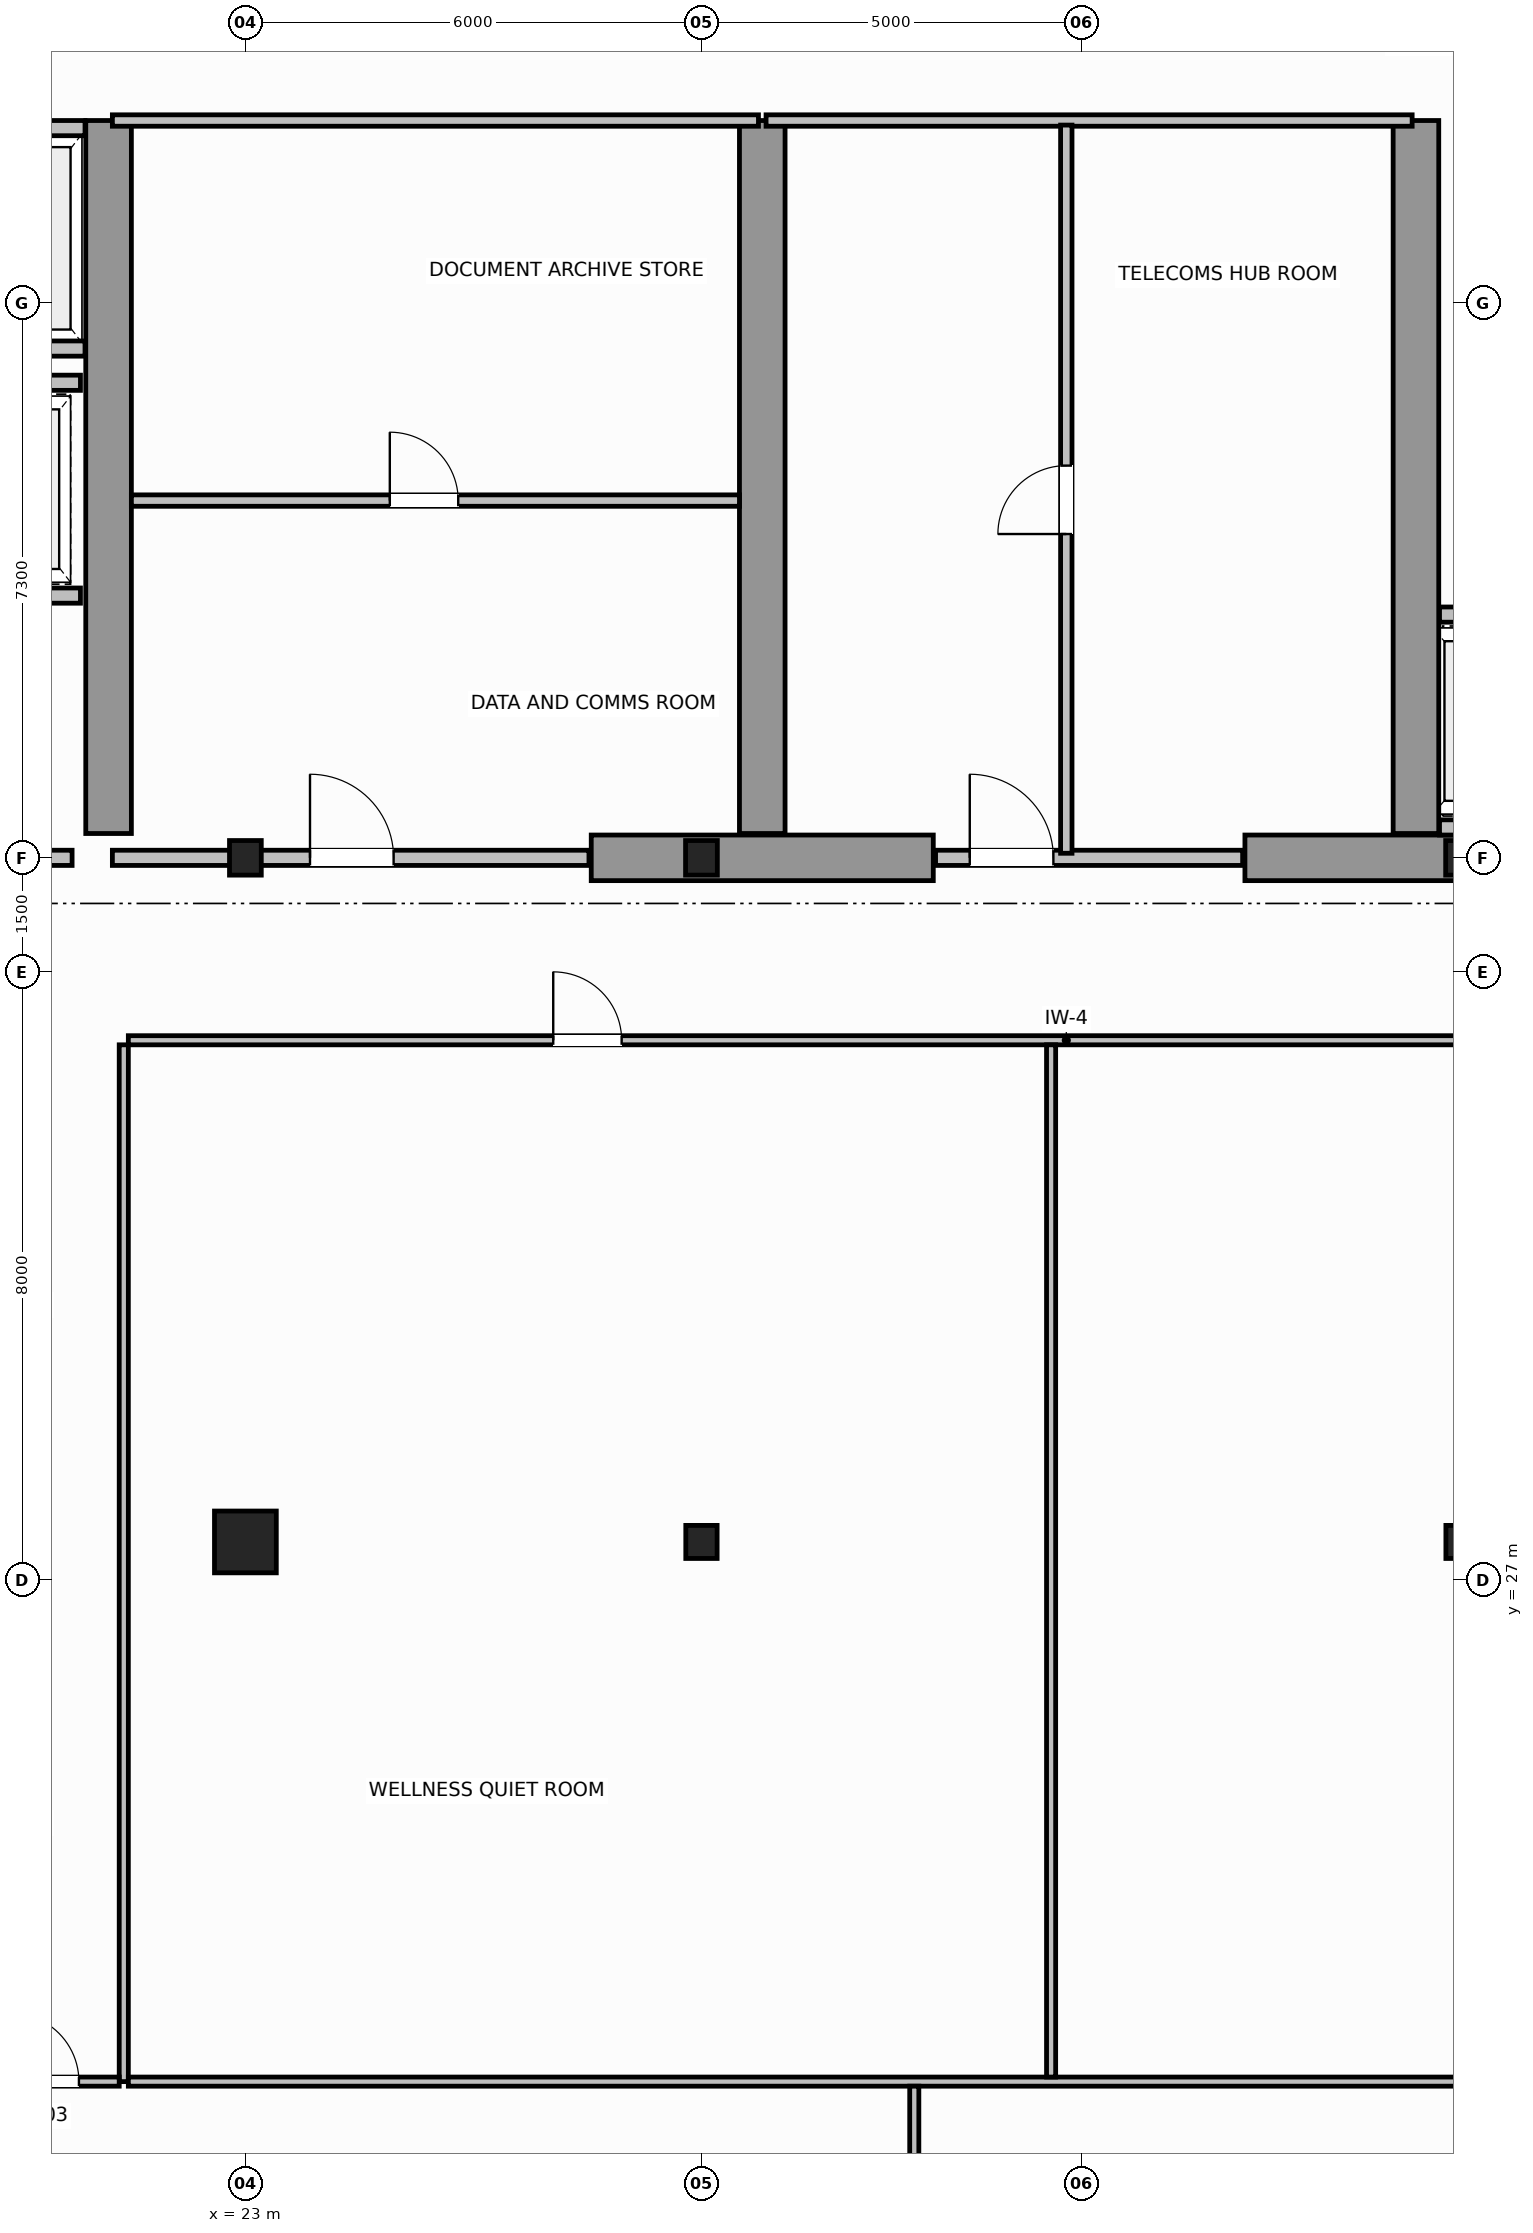
"""IFC4 building model, lengths in metres.
Left out: names, types, materials, properties, quantities, classifications, styles, units other than length and angle.
Written with IfcOpenShell. Run it as: python <this file> out.ifc"""

import sys

from ifc_helpers import new_model, si_unit, direction, frame, frame_2d, origin, origin_2d, place, context, subcontext, project, spatial, rectangle, hollow_circle, i_section, extrude, source, transform, mapped, element, fill, save


model = new_model("IFC4")
c1 = context("Model", 3, precision=1e-05, world=origin(), true_north=direction((0.0, 1.0)))
c2 = subcontext(c1, "Body", "Model", "MODEL_VIEW")
j1 = project(units=[si_unit("LENGTHUNIT", "METRE"), si_unit("PLANEANGLEUNIT", "RADIAN")], contexts=[c1])
p1 = place(None, origin())
s1 = spatial("IfcSite", under=j1, at=p1, CompositionType="ELEMENT")
p2 = place(p1, origin())
s2 = spatial("IfcBuilding", under=s1, at=p2, CompositionType="ELEMENT")
p3 = place(p2, frame((0.0, 0.0, 210.8)))
s3 = spatial("IfcBuildingStorey", under=s2, at=p3, CompositionType="ELEMENT", Elevation=210.8)
m1 = source(origin(), c2, "Body", "SweptSolid", [
    extrude(i_section(OverallWidth=0.418, OverallDepth=0.455, WebThickness=0.042, FlangeThickness=0.058, FilletRadius=0.015, at=origin_2d()), origin(), (0.0, 0.0, 1.0), 3.8),
])
for number, where, z_axis, x_axis in (
    (1, (23.0, 36.5, 0.0), (0.0, 0.0, 1.0), (1.0, 0.0, 0.0)),
    (2, (29.0, 36.5, 0.0), (0.0, 0.0, 1.0), (1.0, 0.0, 0.0)),
    (3, (39.0, 36.5, 0.0), (0.0, 0.0, 1.0), (1.0, 0.0, 0.0)),
):
    element("IfcColumn", number, at=place(p3, frame(where, z_axis=z_axis, x_axis=x_axis)), inside=s3, PredefinedType="COLUMN", context=c2, shape_type="MappedRepresentation", body=[
        mapped(m1, transform((0.0, 0.0, 0.0), scale=1.0)),
    ])
m2 = source(origin(), c2, "Body", "SweptSolid", [
    extrude(hollow_circle(Radius=0.406, WallThickness=0.04, at=origin_2d()), origin(), (0.0, 0.0, 1.0), 3.8),
])
p4 = place(p3, frame((23.0, 27.5, 0.0), z_axis=(0.0, 0.0, 1.0), x_axis=(1.0, 0.0, 0.0)))
e4 = element("IfcColumn", 4, at=p4, inside=s3, PredefinedType="COLUMN", context=c2, shape_type="MappedRepresentation", body=[
    mapped(m2, transform((0.0, 0.0, 0.0), scale=1.0)),
])
m3 = source(origin(), c2, "Body", "SweptSolid", [
    extrude(i_section(OverallWidth=0.412, OverallDepth=0.435, WebThickness=0.036, FlangeThickness=0.05, FilletRadius=0.015, at=origin_2d()), origin(), (0.0, 0.0, 1.0), 3.8),
])
for number, where, z_axis, x_axis in (
    (5, (29.0, 27.5, 0.0), (0.0, 0.0, 1.0), (1.0, 0.0, 0.0)),
    (6, (39.0, 27.5, 0.0), (0.0, 0.0, 1.0), (1.0, 0.0, 0.0)),
):
    element("IfcColumn", number, at=place(p3, frame(where, z_axis=z_axis, x_axis=x_axis)), inside=s3, PredefinedType="COLUMN", context=c2, shape_type="MappedRepresentation", body=[
        mapped(m3, transform((0.0, 0.0, 0.0), scale=1.0)),
    ])
for number, where, z_axis, x_axis in (
    (7, (27.55, 36.5, 0.0), (0.0, 0.0, 1.0), (1.0, 0.0, 0.0)),
    (8, (36.15, 36.5, 0.0), (0.0, 0.0, 1.0), (1.0, 0.0, 0.0)),
):
    element("IfcWall", number, at=place(p3, frame(where, z_axis=z_axis, x_axis=x_axis)), inside=s3, PredefinedType="SHEAR", context=c2, shape_type="SweptSolid", body=[
        extrude(rectangle(XDim=4.5, YDim=0.6, at=frame_2d((2.25, 0.0))), origin(), (0.0, 0.0, 1.0), 3.8),
    ])
for number, where, z_axis, x_axis in (
    (9, (21.2, 36.82, 0.0), (0.0, 0.0, 1.0), (0.0, 1.0, 0.0)),
    (10, (29.8, 36.82, 0.0), (0.0, 0.0, 1.0), (0.0, 1.0, 0.0)),
    (11, (38.4, 36.82, 0.0), (0.0, 0.0, 1.0), (0.0, 1.0, 0.0)),
):
    element("IfcWall", number, at=place(p3, frame(where, z_axis=z_axis, x_axis=x_axis)), inside=s3, PredefinedType="SHEAR", context=c2, shape_type="SweptSolid", body=[
        extrude(rectangle(XDim=9.38, YDim=0.6, at=frame_2d((4.69, 0.0))), origin(), (0.0, 0.0, 1.0), 3.8),
    ])
p5 = place(p3, frame((18.25, 36.5, 0.0), z_axis=(0.0, 0.0, 1.0), x_axis=(1.0, 0.0, 0.0)))
e12 = element("IfcWall", 12, at=p5, inside=s3, PredefinedType="SOLIDWALL", context=c2, shape_type="SweptSolid", body=[
    extrude(rectangle(XDim=2.47, YDim=0.2, at=frame_2d((1.235, 0.0))), origin(), (0.0, 0.0, 1.0), 2.57),
])
p6 = place(p5, frame((0.65, 0.0, 0.0)))
e13 = element("IfcOpeningElement", 13, at=p6, cuts=e12, PredefinedType="OPENING", context=c2, shape_type="SweptSolid", body=[
    extrude(rectangle(XDim=1.1, YDim=2.15, at=frame_2d((0.55, 1.075))), frame((0.0, 0.11, 0.0), z_axis=(0.0, -1.0, 0.0), x_axis=(1.0, 0.0, 0.0)), (0.0, 0.0, 1.0), 0.22),
])
p7 = place(p3, frame((38.71, 39.7, 0.0), z_axis=(0.0, 0.0, 1.0), x_axis=(1.0, 0.0, 0.0)))
e14 = element("IfcWall", 14, at=p7, inside=s3, PredefinedType="SOLIDWALL", context=c2, shape_type="SweptSolid", body=[
    extrude(rectangle(XDim=1.92, YDim=0.2, at=frame_2d((0.96, 0.0))), origin(), (0.0, 0.0, 1.0), 3.58),
])
p8 = place(p7, frame((0.41, 0.0, 0.0)))
e15 = element("IfcOpeningElement", 15, at=p8, cuts=e14, PredefinedType="OPENING", context=c2, shape_type="SweptSolid", body=[
    extrude(rectangle(XDim=1.1, YDim=2.15, at=frame_2d((0.55, 1.075))), frame((0.0, 0.11, 0.0), z_axis=(0.0, -1.0, 0.0), x_axis=(1.0, 0.0, 0.0)), (0.0, 0.0, 1.0), 0.22),
])
p9 = place(p3, frame((38.71, 36.9, 0.0), z_axis=(0.0, 0.0, 1.0), x_axis=(1.0, 0.0, 0.0)))
e16 = element("IfcWall", 16, at=p9, inside=s3, PredefinedType="SOLIDWALL", context=c2, shape_type="SweptSolid", body=[
    extrude(rectangle(XDim=1.92, YDim=0.2, at=frame_2d((0.96, 0.0))), origin(), (0.0, 0.0, 1.0), 3.58),
])
p10 = place(p3, frame((18.67, 46.1, 0.0), z_axis=(0.0, 0.0, 1.0), x_axis=(1.0, 0.0, 0.0)))
e17 = element("IfcWall", 17, at=p10, inside=s3, PredefinedType="SOLIDWALL", context=c2, shape_type="SweptSolid", body=[
    extrude(rectangle(XDim=2.22, YDim=0.2, at=frame_2d((1.11, 0.0))), origin(), (0.0, 0.0, 1.0), 3.58),
])
p11 = place(p10, frame((0.56, 0.0, 0.0)))
e18 = element("IfcOpeningElement", 18, at=p11, cuts=e17, PredefinedType="OPENING", context=c2, shape_type="SweptSolid", body=[
    extrude(rectangle(XDim=1.1, YDim=2.15, at=frame_2d((0.55, 1.075))), frame((0.0, 0.11, 0.0), z_axis=(0.0, -1.0, 0.0), x_axis=(1.0, 0.0, 0.0)), (0.0, 0.0, 1.0), 0.22),
])
p12 = place(p3, frame((18.67, 43.2, 0.0), z_axis=(0.0, 0.0, 1.0), x_axis=(1.0, 0.0, 0.0)))
e19 = element("IfcWall", 19, at=p12, inside=s3, PredefinedType="SOLIDWALL", context=c2, shape_type="SweptSolid", body=[
    extrude(rectangle(XDim=2.22, YDim=0.2, at=frame_2d((1.11, 0.0))), origin(), (0.0, 0.0, 1.0), 3.58),
])
p13 = place(p3, frame((18.67, 39.95, 0.0), z_axis=(0.0, 0.0, 1.0), x_axis=(1.0, 0.0, 0.0)))
e20 = element("IfcWall", 20, at=p13, inside=s3, PredefinedType="SOLIDWALL", context=c2, shape_type="SweptSolid", body=[
    extrude(rectangle(XDim=2.16, YDim=0.2, at=frame_2d((1.08, 0.0))), origin(), (0.0, 0.0, 1.0), 3.58),
])
p14 = place(p13, frame((0.53, 0.0, 0.0)))
e21 = element("IfcOpeningElement", 21, at=p14, cuts=e20, PredefinedType="OPENING", context=c2, shape_type="SweptSolid", body=[
    extrude(rectangle(XDim=1.1, YDim=2.15, at=frame_2d((0.55, 1.075))), frame((0.0, 0.11, 0.0), z_axis=(0.0, -1.0, 0.0), x_axis=(1.0, 0.0, 0.0)), (0.0, 0.0, 1.0), 0.22),
])
p15 = place(p3, frame((18.67, 42.75, 0.0), z_axis=(0.0, 0.0, 1.0), x_axis=(1.0, 0.0, 0.0)))
e22 = element("IfcWall", 22, at=p15, inside=s3, PredefinedType="SOLIDWALL", context=c2, shape_type="SweptSolid", body=[
    extrude(rectangle(XDim=2.16, YDim=0.2, at=frame_2d((1.08, 0.0))), origin(), (0.0, 0.0, 1.0), 3.58),
])
p16 = place(p3, frame((21.25, 36.5, 0.0), z_axis=(0.0, 0.0, 1.0), x_axis=(1.0, 0.0, 0.0)))
e23 = element("IfcWall", 23, at=p16, inside=s3, PredefinedType="SOLIDWALL", context=c2, shape_type="SweptSolid", body=[
    extrude(rectangle(XDim=6.27, YDim=0.2, at=frame_2d((3.135, 0.0))), origin(), (0.0, 0.0, 1.0), 2.57),
])
p17 = place(p16, frame((2.6, 0.0, 0.0)))
e24 = element("IfcOpeningElement", 24, at=p17, cuts=e23, PredefinedType="OPENING", context=c2, shape_type="SweptSolid", body=[
    extrude(rectangle(XDim=1.1, YDim=2.15, at=frame_2d((0.55, 1.075))), frame((0.0, 0.11, 0.0), z_axis=(0.0, -1.0, 0.0), x_axis=(1.0, 0.0, 0.0)), (0.0, 0.0, 1.0), 0.22),
])
p18 = place(p3, frame((21.25, 46.2, 0.0), z_axis=(0.0, 0.0, 1.0), x_axis=(1.0, 0.0, 0.0)))
e25 = element("IfcWall", 25, at=p18, inside=s3, PredefinedType="PARTITIONING", context=c2, shape_type="SweptSolid", body=[
    extrude(rectangle(XDim=8.5, YDim=0.15, at=frame_2d((4.25, 0.0))), origin(), (0.0, 0.0, 1.0), 3.58),
])
p19 = place(p3, frame((21.5, 41.2, 0.0), z_axis=(0.0, 0.0, 1.0), x_axis=(1.0, 0.0, 0.0)))
e26 = element("IfcWall", 26, at=p19, inside=s3, PredefinedType="PARTITIONING", context=c2, shape_type="SweptSolid", body=[
    extrude(rectangle(XDim=8.0, YDim=0.15, at=frame_2d((4.0, 0.0))), origin(), (0.0, 0.0, 1.0), 3.58),
])
p20 = place(p19, frame((3.4, 0.0, 0.0)))
e27 = element("IfcOpeningElement", 27, at=p20, cuts=e26, PredefinedType="OPENING", context=c2, shape_type="SweptSolid", body=[
    extrude(rectangle(XDim=0.9, YDim=2.1, at=frame_2d((0.45, 1.05))), frame((0.0, 0.085, 0.0), z_axis=(0.0, -1.0, 0.0), x_axis=(1.0, 0.0, 0.0)), (0.0, 0.0, 1.0), 0.17),
])
p21 = place(p3, frame((32.08, 36.5, 0.0), z_axis=(0.0, 0.0, 1.0), x_axis=(1.0, 0.0, 0.0)))
e28 = element("IfcWall", 28, at=p21, inside=s3, PredefinedType="SOLIDWALL", context=c2, shape_type="SweptSolid", body=[
    extrude(rectangle(XDim=4.04, YDim=0.2, at=frame_2d((2.02, 0.0))), origin(), (0.0, 0.0, 1.0), 2.97),
])
p22 = place(p21, frame((0.45, 0.0, 0.0)))
e29 = element("IfcOpeningElement", 29, at=p22, cuts=e28, PredefinedType="OPENING", context=c2, shape_type="SweptSolid", body=[
    extrude(rectangle(XDim=1.1, YDim=2.15, at=frame_2d((0.55, 1.075))), frame((0.0, 0.11, 0.0), z_axis=(0.0, -1.0, 0.0), x_axis=(1.0, 0.0, 0.0)), (0.0, 0.0, 1.0), 0.22),
])
p23 = place(p3, frame((29.85, 46.2, 0.0), z_axis=(0.0, 0.0, 1.0), x_axis=(1.0, 0.0, 0.0)))
e30 = element("IfcWall", 30, at=p23, inside=s3, PredefinedType="PARTITIONING", context=c2, shape_type="SweptSolid", body=[
    extrude(rectangle(XDim=8.5, YDim=0.15, at=frame_2d((4.25, 0.0))), origin(), (0.0, 0.0, 1.0), 3.58),
])
p24 = place(p3, frame((33.8, 36.56, 0.0), z_axis=(0.0, 0.0, 1.0), x_axis=(0.0, 1.0, 0.0)))
e31 = element("IfcWall", 31, at=p24, inside=s3, PredefinedType="PARTITIONING", context=c2, shape_type="SweptSolid", body=[
    extrude(rectangle(XDim=9.58, YDim=0.15, at=frame_2d((4.79, 0.0))), origin(), (0.0, 0.0, 1.0), 3.58),
])
p25 = place(p24, frame((4.2, 0.0, 0.0)))
e32 = element("IfcOpeningElement", 32, at=p25, cuts=e31, PredefinedType="OPENING", context=c2, shape_type="SweptSolid", body=[
    extrude(rectangle(XDim=0.9, YDim=2.1, at=frame_2d((0.45, 1.05))), frame((0.0, 0.085, 0.0), z_axis=(0.0, -1.0, 0.0), x_axis=(1.0, 0.0, 0.0)), (0.0, 0.0, 1.0), 0.17),
])
p26 = place(p3, frame((21.46, 34.1, 0.0), z_axis=(0.0, 0.0, 1.0), x_axis=(1.0, 0.0, 0.0)))
e33 = element("IfcWall", 33, at=p26, inside=s3, PredefinedType="PARTITIONING", context=c2, shape_type="SweptSolid", body=[
    extrude(rectangle(XDim=25.08, YDim=0.12, at=frame_2d((12.54, 0.0))), origin(), (0.0, 0.0, 1.0), 3.58),
])
p27 = place(p26, frame((5.59, 0.0, 0.0)))
e34 = element("IfcOpeningElement", 34, at=p27, cuts=e33, PredefinedType="OPENING", context=c2, shape_type="SweptSolid", body=[
    extrude(rectangle(XDim=0.9, YDim=2.15, at=frame_2d((0.45, 1.075))), frame((0.0, 0.07, 0.0), z_axis=(0.0, -1.0, 0.0), x_axis=(1.0, 0.0, 0.0)), (0.0, 0.0, 1.0), 0.14),
])
p28 = place(p26, frame((18.19, 0.0, 0.0)))
e35 = element("IfcOpeningElement", 35, at=p28, cuts=e33, PredefinedType="OPENING", context=c2, shape_type="SweptSolid", body=[
    extrude(rectangle(XDim=0.9, YDim=2.15, at=frame_2d((0.45, 1.075))), frame((0.0, 0.07, 0.0), z_axis=(0.0, -1.0, 0.0), x_axis=(1.0, 0.0, 0.0)), (0.0, 0.0, 1.0), 0.14),
])
p29 = place(p3, frame((21.4, 20.4, 0.0), z_axis=(0.0, 0.0, 1.0), x_axis=(0.0, 1.0, 0.0)))
e36 = element("IfcWall", 36, at=p29, inside=s3, PredefinedType="PARTITIONING", context=c2, shape_type="SweptSolid", body=[
    extrude(rectangle(XDim=13.64, YDim=0.12, at=frame_2d((6.82, 0.0))), origin(), (0.0, 0.0, 1.0), 3.58),
])
p30 = place(p3, frame((19.46, 20.4, 0.0), z_axis=(0.0, 0.0, 1.0), x_axis=(1.0, 0.0, 0.0)))
e37 = element("IfcWall", 37, at=p30, inside=s3, PredefinedType="PARTITIONING", context=c2, shape_type="SweptSolid", body=[
    extrude(rectangle(XDim=1.88, YDim=0.12, at=frame_2d((0.94, 0.0))), origin(), (0.0, 0.0, 1.0), 3.58),
])
p31 = place(p30, frame((0.45, 0.0, 0.0)))
e38 = element("IfcOpeningElement", 38, at=p31, cuts=e37, PredefinedType="OPENING", context=c2, shape_type="SweptSolid", body=[
    extrude(rectangle(XDim=0.9, YDim=2.15, at=frame_2d((0.45, 1.075))), frame((0.0, 0.07, 0.0), z_axis=(0.0, -1.0, 0.0), x_axis=(1.0, 0.0, 0.0)), (0.0, 0.0, 1.0), 0.14),
])
p32 = place(p3, frame((21.46, 20.4, 0.0), z_axis=(0.0, 0.0, 1.0), x_axis=(1.0, 0.0, 0.0)))
e39 = element("IfcWall", 39, at=p32, inside=s3, PredefinedType="PARTITIONING", context=c2, shape_type="SweptSolid", body=[
    extrude(rectangle(XDim=25.08, YDim=0.12, at=frame_2d((12.54, 0.0))), origin(), (0.0, 0.0, 1.0), 3.58),
])
p33 = place(p3, frame((33.6, 20.46, 0.0), z_axis=(0.0, 0.0, 1.0), x_axis=(0.0, 1.0, 0.0)))
e40 = element("IfcWall", 40, at=p33, inside=s3, PredefinedType="PARTITIONING", context=c2, shape_type="SweptSolid", body=[
    extrude(rectangle(XDim=13.58, YDim=0.12, at=frame_2d((6.79, 0.0))), origin(), (0.0, 0.0, 1.0), 3.58),
])
p34 = place(p3, frame((31.8, 13.24, 0.0), z_axis=(0.0, 0.0, 1.0), x_axis=(0.0, 1.0, 0.0)))
e41 = element("IfcWall", 41, at=p34, inside=s3, PredefinedType="PARTITIONING", context=c2, shape_type="SweptSolid", body=[
    extrude(rectangle(XDim=7.1, YDim=0.12, at=frame_2d((3.55, 0.0))), origin(), (0.0, 0.0, 1.0), 3.58),
])
p35 = place(p34, frame((3.1, 0.0, 0.0)))
e42 = element("IfcOpeningElement", 42, at=p35, cuts=e41, PredefinedType="OPENING", context=c2, shape_type="SweptSolid", body=[
    extrude(rectangle(XDim=0.9, YDim=2.15, at=frame_2d((0.45, 1.075))), frame((0.0, 0.07, 0.0), z_axis=(0.0, -1.0, 0.0), x_axis=(1.0, 0.0, 0.0)), (0.0, 0.0, 1.0), 0.14),
])
m4 = source(origin(), c2, "Body", "SweptSolid", [
    extrude(rectangle(XDim=1.1, YDim=2.15, at=frame_2d((0.55, 1.075))), frame((0.0, 0.025, 0.0), z_axis=(0.0, -1.0, 0.0), x_axis=(1.0, 0.0, 0.0)), (0.0, 0.0, 1.0), 0.05),
])
p36 = place(p17, origin())
e43 = element("IfcDoor", 43, at=p36, inside=s3, OperationType="SINGLE_SWING_LEFT", PredefinedType="DOOR", context=c2, shape_type="MappedRepresentation", body=[
    mapped(m4, transform((0.0, 0.0, 0.0), scale=1.0)),
])
fill(e24, e43)
m5 = source(origin(), c2, "Body", "SweptSolid", [
    extrude(rectangle(XDim=0.9, YDim=2.1, at=frame_2d((0.45, 1.05))), frame((0.0, 0.025, 0.0), z_axis=(0.0, -1.0, 0.0), x_axis=(1.0, 0.0, 0.0)), (0.0, 0.0, 1.0), 0.05),
])
p37 = place(p20, origin())
e44 = element("IfcDoor", 44, at=p37, inside=s3, OperationType="SINGLE_SWING_RIGHT", PredefinedType="DOOR", context=c2, shape_type="MappedRepresentation", body=[
    mapped(m5, transform((0.0, 0.0, 0.0), scale=1.0)),
])
fill(e27, e44)
p38 = place(p22, origin())
e45 = element("IfcDoor", 45, at=p38, inside=s3, OperationType="SINGLE_SWING_LEFT", PredefinedType="DOOR", context=c2, shape_type="MappedRepresentation", body=[
    mapped(m4, transform((0.0, 0.0, 0.0), scale=1.0)),
])
fill(e29, e45)
p39 = place(p25, origin())
e46 = element("IfcDoor", 46, at=p39, inside=s3, OperationType="SINGLE_SWING_RIGHT", PredefinedType="DOOR", context=c2, shape_type="MappedRepresentation", body=[
    mapped(m5, transform((0.0, 0.0, 0.0), scale=1.0)),
])
fill(e32, e46)
m6 = source(origin(), c2, "Body", "SweptSolid", [
    extrude(rectangle(XDim=0.9, YDim=2.15, at=frame_2d((0.45, 1.075))), frame((0.0, 0.025, 0.0), z_axis=(0.0, -1.0, 0.0), x_axis=(1.0, 0.0, 0.0)), (0.0, 0.0, 1.0), 0.05),
])
p40 = place(p27, origin())
e47 = element("IfcDoor", 47, at=p40, inside=s3, OperationType="SINGLE_SWING_LEFT", PredefinedType="DOOR", context=c2, shape_type="MappedRepresentation", body=[
    mapped(m6, transform((0.0, 0.0, 0.0), scale=1.0)),
])
fill(e34, e47)
p41 = place(p31, origin())
e48 = element("IfcDoor", 48, at=p41, inside=s3, OperationType="SINGLE_SWING_LEFT", PredefinedType="DOOR", context=c2, shape_type="MappedRepresentation", body=[
    mapped(m6, transform((0.0, 0.0, 0.0), scale=1.0)),
])
fill(e38, e48)
save(model, sys.argv[1])
